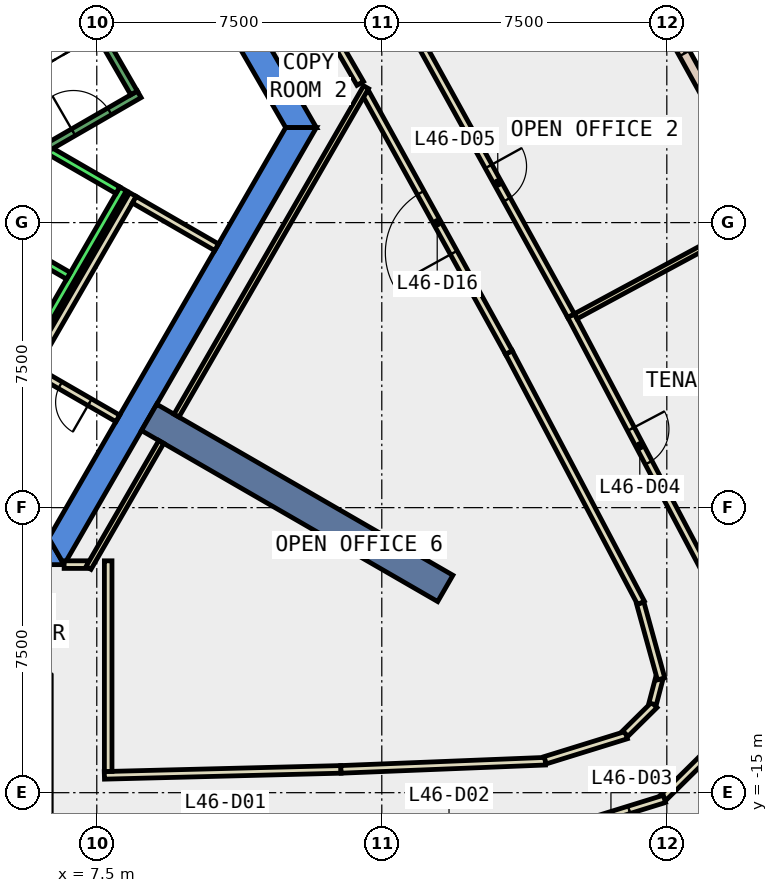
"""IFC4 building model, lengths in metres.
Left out: names, types, materials, properties, quantities, classifications, styles, units other than length and angle.
Written with IfcOpenShell. Run it as: python <this file> out.ifc"""

import sys

from ifc_helpers import new_model, si_unit, direction, frame, frame_2d, origin, place, context, subcontext, project, spatial, polyline, rectangle, outline, extrude, element, fill, save


model = new_model("IFC4")
c1 = context("Model", 3, precision=1e-05, world=origin(), true_north=direction((0.0, 1.0)))
c2 = subcontext(c1, "Body", "Model", "MODEL_VIEW")
j1 = project(units=[si_unit("LENGTHUNIT", "METRE"), si_unit("PLANEANGLEUNIT", "RADIAN")], contexts=[c1])
p1 = place(None, origin())
s1 = spatial("IfcSite", under=j1, at=p1, CompositionType="ELEMENT")
p2 = place(p1, origin())
s2 = spatial("IfcBuilding", under=s1, at=p2, CompositionType="ELEMENT")
p3 = place(p2, frame((0.0, 0.0, 206.6)))
s3 = spatial("IfcBuildingStorey", under=s2, at=p3, CompositionType="ELEMENT", Elevation=206.6)
p4 = place(p3, frame((0.0, 0.0, -0.4)))
e1 = element("IfcWall", 1, at=p4, inside=s3, PredefinedType="SHEAR", context=c2, shape_type="SweptSolid", body=[
    extrude(outline(polyline([(8.084, 11.498), (7.478, 11.148), (12.471, 2.5), (13.279, 2.5), (8.084, 11.498)])), origin(), (0.0, 0.0, 1.0), 4.2),
])
p5 = place(p3, frame((0.0, 0.0, -0.4)))
e2 = element("IfcWall", 2, at=p5, inside=s3, PredefinedType="SHEAR", context=c2, shape_type="SweptSolid", body=[
    extrude(outline(polyline([(5.75, -8.3), (5.75, -9.0), (6.64, -9.0), (6.235, -8.3), (5.75, -8.3)])), origin(), (0.0, 0.0, 1.0), 4.2),
])
p6 = place(p3, frame((0.0, 0.0, -0.4)))
e3 = element("IfcWall", 3, at=p6, inside=s3, PredefinedType="SHEAR", context=c2, shape_type="SweptSolid", body=[
    extrude(outline(polyline([(6.64, -9.0), (13.279, 2.5), (12.471, 2.5), (6.235, -8.3), (6.64, -9.0)])), origin(), (0.0, 0.0, 1.0), 4.2),
])
p7 = place(p3, frame((8.877, -5.125, -0.4), z_axis=(0.0, 0.0, 1.0), x_axis=(0.866017533419, -0.500013631625, 0.0)))
e4 = element("IfcWall", 4, at=p7, inside=s3, PredefinedType="SHEAR", context=c2, shape_type="SweptSolid", body=[
    extrude(rectangle(XDim=9.0, YDim=0.8, at=frame_2d((4.5, 0.0))), origin(), (0.0, 0.0, 1.0), 4.2),
])
p8 = place(p3, frame((25.01, 0.751, 0.0), z_axis=(0.0, 0.0, 1.0), x_axis=(-0.483590905878, 0.875294142419, 0.0)))
e5 = element("IfcWall", 5, at=p8, inside=s3, PredefinedType="STANDARD", context=c2, shape_type="SweptSolid", body=[
    extrude(rectangle(XDim=7.238, YDim=0.3, at=frame_2d((3.619, 0.0))), origin(), (0.0, 0.0, 1.0), 3.8),
])
p9 = place(p8, frame((0.609, 0.0, 0.9)))
e6 = element("IfcOpeningElement", 6, at=p9, cuts=e5, PredefinedType="OPENING", context=c2, shape_type="SweptSolid", body=[
    extrude(rectangle(XDim=2.4, YDim=2.6, at=frame_2d((1.2, 1.3))), frame((0.0, 0.16, 0.0), z_axis=(0.0, -1.0, 0.0), x_axis=(1.0, 0.0, 0.0)), (0.0, 0.0, 1.0), 0.32),
])
p10 = place(p8, frame((4.228, 0.0, 0.9)))
e7 = element("IfcOpeningElement", 7, at=p10, cuts=e5, PredefinedType="OPENING", context=c2, shape_type="SweptSolid", body=[
    extrude(rectangle(XDim=2.4, YDim=2.6, at=frame_2d((1.2, 1.3))), frame((0.0, 0.16, 0.0), z_axis=(0.0, -1.0, 0.0), x_axis=(1.0, 0.0, 0.0)), (0.0, 0.0, 1.0), 0.32),
])
p11 = place(p3, frame((14.433, 3.663, 0.0), z_axis=(0.0, 0.0, 1.0), x_axis=(-0.500149526678, 0.865939057303, 0.0)))
e8 = element("IfcWall", 8, at=p11, inside=s3, PredefinedType="PARTITIONING", context=c2, shape_type="SweptSolid", body=[
    extrude(rectangle(XDim=3.843, YDim=0.2, at=frame_2d((1.921, 0.0))), origin(), (0.0, 0.0, 1.0), 3.8),
])
p12 = place(p11, frame((1.422, 0.0, 0.0)))
e9 = element("IfcOpeningElement", 9, at=p12, cuts=e8, PredefinedType="OPENING", context=c2, shape_type="SweptSolid", body=[
    extrude(rectangle(XDim=1.0, YDim=2.1, at=frame_2d((0.5, 1.05))), frame((0.0, 0.11, 0.0), z_axis=(0.0, -1.0, 0.0), x_axis=(1.0, 0.0, 0.0)), (0.0, 0.0, 1.0), 0.22),
])
p13 = place(p3, frame((7.7, -14.544, 0.0), z_axis=(0.0, 0.0, 1.0), x_axis=(0.99968218628, 0.025209649611, 0.0)))
e10 = element("IfcWall", 10, at=p13, inside=s3, PredefinedType="PARTITIONING", context=c2, shape_type="SweptSolid", body=[
    extrude(rectangle(XDim=6.227, YDim=0.2, at=frame_2d((3.114, 0.0))), origin(), (0.0, 0.0, 1.0), 3.8),
])
p14 = place(p3, frame((13.925, -14.387, 0.0), z_axis=(0.0, 0.0, 1.0), x_axis=(0.999202986342, 0.039917315597, 0.0)))
e11 = element("IfcWall", 11, at=p14, inside=s3, PredefinedType="PARTITIONING", context=c2, shape_type="SweptSolid", body=[
    extrude(rectangle(XDim=5.382, YDim=0.2, at=frame_2d((2.691, 0.0))), origin(), (0.0, 0.0, 1.0), 3.8),
])
p15 = place(p3, frame((19.299, -14.147, 0.0), z_axis=(0.0, 0.0, 1.0), x_axis=(0.955241047187, 0.295828568211, 0.0)))
e12 = element("IfcWall", 12, at=p15, inside=s3, PredefinedType="PARTITIONING", context=c2, shape_type="SweptSolid", body=[
    extrude(rectangle(XDim=2.234, YDim=0.2, at=frame_2d((1.117, 0.0))), origin(), (0.0, 0.0, 1.0), 3.8),
])
p16 = place(p3, frame((21.408, -13.445, 0.0), z_axis=(0.0, 0.0, 1.0), x_axis=(0.711298443117, 0.702890122863, 0.0)))
e13 = element("IfcWall", 13, at=p16, inside=s3, PredefinedType="PARTITIONING", context=c2, shape_type="SweptSolid", body=[
    extrude(rectangle(XDim=1.074, YDim=0.2, at=frame_2d((0.537, 0.0))), origin(), (0.0, 0.0, 1.0), 3.8),
])
p17 = place(p3, frame((22.126, -12.664, 0.0), z_axis=(0.0, 0.0, 1.0), x_axis=(0.253079435581, 0.967445501972, 0.0)))
e14 = element("IfcWall", 14, at=p17, inside=s3, PredefinedType="PARTITIONING", context=c2, shape_type="SweptSolid", body=[
    extrude(rectangle(XDim=0.68, YDim=0.2, at=frame_2d((0.34, 0.0))), origin(), (0.0, 0.0, 1.0), 3.8),
])
p18 = place(p3, frame((22.35, -12.006, 0.0), z_axis=(0.0, 0.0, 1.0), x_axis=(-0.265584627827, 0.964087550725, 0.0)))
e15 = element("IfcWall", 15, at=p18, inside=s3, PredefinedType="PARTITIONING", context=c2, shape_type="SweptSolid", body=[
    extrude(rectangle(XDim=2.067, YDim=0.2, at=frame_2d((1.034, 0.0))), origin(), (0.0, 0.0, 1.0), 3.8),
])
p19 = place(p3, frame((21.821, -10.005, 0.0), z_axis=(0.0, 0.0, 1.0), x_axis=(-0.466770012358, 0.884378739887, 0.0)))
e16 = element("IfcWall", 16, at=p19, inside=s3, PredefinedType="PARTITIONING", context=c2, shape_type="SweptSolid", body=[
    extrude(rectangle(XDim=7.449, YDim=0.2, at=frame_2d((3.725, 0.0))), origin(), (0.0, 0.0, 1.0), 3.8),
])
p20 = place(p3, frame((18.344, -3.417, 0.0), z_axis=(0.0, 0.0, 1.0), x_axis=(-0.483555501116, 0.875313702247, 0.0)))
e17 = element("IfcWall", 17, at=p20, inside=s3, PredefinedType="PARTITIONING", context=c2, shape_type="SweptSolid", body=[
    extrude(rectangle(XDim=7.801, YDim=0.2, at=frame_2d((3.9, 0.0))), origin(), (0.0, 0.0, 1.0), 3.8),
])
p21 = place(p20, frame((3.0, 0.0, 0.0)))
e18 = element("IfcOpeningElement", 18, at=p21, cuts=e17, PredefinedType="OPENING", context=c2, shape_type="SweptSolid", body=[
    extrude(rectangle(XDim=1.8, YDim=2.1, at=frame_2d((0.9, 1.05))), frame((0.0, 0.11, 0.0), z_axis=(0.0, -1.0, 0.0), x_axis=(1.0, 0.0, 0.0)), (0.0, 0.0, 1.0), 0.22),
])
p22 = place(p3, frame((23.878, -13.675, 0.0), z_axis=(0.0, 0.0, 1.0), x_axis=(-0.710949827962, -0.703242733429, 0.0)))
e19 = element("IfcWall", 19, at=p22, inside=s3, PredefinedType="PARTITIONING", context=c2, shape_type="SweptSolid", body=[
    extrude(rectangle(XDim=2.059, YDim=0.2, at=frame_2d((1.03, 0.0))), origin(), (0.0, 0.0, 1.0), 3.8),
])
p23 = place(p3, frame((22.438, -15.163, 0.0), z_axis=(0.0, 0.0, 1.0), x_axis=(-0.955234616163, -0.295849333419, 0.0)))
e20 = element("IfcWall", 20, at=p23, inside=s3, PredefinedType="PARTITIONING", context=c2, shape_type="SweptSolid", body=[
    extrude(rectangle(XDim=2.947, YDim=0.2, at=frame_2d((1.473, 0.0))), origin(), (0.0, 0.0, 1.0), 3.8),
])
p24 = place(p23, frame((0.974, 0.0, 0.0)))
e21 = element("IfcOpeningElement", 21, at=p24, cuts=e20, PredefinedType="OPENING", context=c2, shape_type="SweptSolid", body=[
    extrude(rectangle(XDim=1.0, YDim=2.1, at=frame_2d((0.5, 1.05))), frame((0.0, 0.11, 0.0), z_axis=(0.0, -1.0, 0.0), x_axis=(1.0, 0.0, 0.0)), (0.0, 0.0, 1.0), 0.22),
])
p25 = place(p3, frame((19.98, -2.448, 0.0), z_axis=(0.0, 0.0, 1.0), x_axis=(0.466864023915, -0.884329114738, 0.0)))
e22 = element("IfcWall", 22, at=p25, inside=s3, PredefinedType="PARTITIONING", context=c2, shape_type="SweptSolid", body=[
    extrude(rectangle(XDim=7.75, YDim=0.2, at=frame_2d((3.875, 0.0))), origin(), (0.0, 0.0, 1.0), 3.8),
])
p26 = place(p25, frame((3.375, 0.0, 0.0)))
e23 = element("IfcOpeningElement", 23, at=p26, cuts=e22, PredefinedType="OPENING", context=c2, shape_type="SweptSolid", body=[
    extrude(rectangle(XDim=1.0, YDim=2.1, at=frame_2d((0.5, 1.05))), frame((0.0, 0.11, 0.0), z_axis=(0.0, -1.0, 0.0), x_axis=(1.0, 0.0, 0.0)), (0.0, 0.0, 1.0), 0.22),
])
p27 = place(p3, frame((16.051, 4.663, 0.0), z_axis=(0.0, 0.0, 1.0), x_axis=(0.483513440344, -0.875336936846, 0.0)))
e24 = element("IfcWall", 24, at=p27, inside=s3, PredefinedType="PARTITIONING", context=c2, shape_type="SweptSolid", body=[
    extrude(rectangle(XDim=8.124, YDim=0.2, at=frame_2d((4.062, 0.0))), origin(), (0.0, 0.0, 1.0), 3.8),
])
p28 = place(p27, frame((3.637, 0.0, 0.0)))
e25 = element("IfcOpeningElement", 25, at=p28, cuts=e24, PredefinedType="OPENING", context=c2, shape_type="SweptSolid", body=[
    extrude(rectangle(XDim=1.0, YDim=2.1, at=frame_2d((0.5, 1.05))), frame((0.0, 0.11, 0.0), z_axis=(0.0, -1.0, 0.0), x_axis=(1.0, 0.0, 0.0)), (0.0, 0.0, 1.0), 0.22),
])
p29 = place(p3, frame((8.053, -5.152, 0.0), z_axis=(0.0, 0.0, 1.0), x_axis=(-0.866022959057, 0.500004234368, 0.0)))
e26 = element("IfcWall", 26, at=p29, inside=s3, PredefinedType="PARTITIONING", context=c2, shape_type="SweptSolid", body=[
    extrude(rectangle(XDim=2.5, YDim=0.2, at=frame_2d((1.25, 0.0))), origin(), (0.0, 0.0, 1.0), 3.8),
])
p30 = place(p29, frame((0.85, 0.0, 0.0)))
e27 = element("IfcOpeningElement", 27, at=p30, cuts=e26, PredefinedType="OPENING", context=c2, shape_type="SweptSolid", body=[
    extrude(rectangle(XDim=0.9, YDim=2.1, at=frame_2d((0.45, 1.05))), frame((0.0, 0.11, 0.0), z_axis=(0.0, -1.0, 0.0), x_axis=(1.0, 0.0, 0.0)), (0.0, 0.0, 1.0), 0.22),
])
p31 = place(p3, frame((5.751, -3.938, 0.0), z_axis=(0.0, 0.0, 1.0), x_axis=(0.500034260056, 0.866005622828, 0.0)))
e28 = element("IfcWall", 28, at=p31, inside=s3, PredefinedType="PARTITIONING", context=c2, shape_type="SweptSolid", body=[
    extrude(rectangle(XDim=5.399, YDim=0.2, at=frame_2d((2.7, 0.0))), origin(), (0.0, 0.0, 1.0), 3.8),
])
p32 = place(p3, frame((8.488, 0.602, 0.0), z_axis=(0.0, 0.0, 1.0), x_axis=(0.866022959057, -0.500004234368, 0.0)))
e29 = element("IfcWall", 29, at=p32, inside=s3, PredefinedType="PARTITIONING", context=c2, shape_type="SweptSolid", body=[
    extrude(rectangle(XDim=2.5, YDim=0.2, at=frame_2d((1.25, 0.0))), origin(), (0.0, 0.0, 1.0), 3.8),
])
p33 = place(p3, frame((6.641, -8.999, 0.0), z_axis=(0.0, 0.0, 1.0), x_axis=(1.0, 0.0, 0.0)))
e30 = element("IfcWall", 30, at=p33, inside=s3, PredefinedType="PARTITIONING", context=c2, shape_type="SweptSolid", body=[
    extrude(rectangle(XDim=0.617, YDim=0.2, at=frame_2d((0.309, 0.0))), origin(), (0.0, 0.0, 1.0), 3.8),
])
p34 = place(p3, frame((7.283, -9.086, 0.0), z_axis=(0.0, 0.0, 1.0), x_axis=(0.500035303972, 0.866005020067, 0.0)))
e31 = element("IfcWall", 31, at=p34, inside=s3, PredefinedType="PARTITIONING", context=c2, shape_type="SweptSolid", body=[
    extrude(rectangle(XDim=3.828, YDim=0.15, at=frame_2d((1.914, 0.0))), origin(), (0.0, 0.0, 1.0), 3.8),
])
p35 = place(p3, frame((7.8, -8.899, 0.0), z_axis=(0.0, 0.0, 1.0), x_axis=(0.0, -1.0, 0.0)))
e32 = element("IfcWall", 32, at=p35, inside=s3, PredefinedType="PARTITIONING", context=c2, shape_type="SweptSolid", body=[
    extrude(rectangle(XDim=5.542, YDim=0.2, at=frame_2d((2.771, 0.0))), origin(), (0.0, 0.0, 1.0), 3.8),
])
p36 = place(p3, frame((20.103, -2.466, 0.0), z_axis=(0.0, 0.0, 1.0), x_axis=(0.879965969606, 0.475036727354, 0.0)))
e33 = element("IfcWall", 33, at=p36, inside=s3, PredefinedType="PARTITIONING", context=c2, shape_type="SweptSolid", body=[
    extrude(rectangle(XDim=4.381, YDim=0.15, at=frame_2d((2.19, 0.0))), origin(), (0.0, 0.0, 1.0), 3.8),
])
p37 = place(p3, frame((9.597, -5.079, 0.0), z_axis=(0.0, 0.0, 1.0), x_axis=(0.499962477963, 0.866047066059, 0.0)))
e34 = element("IfcWall", 34, at=p37, inside=s3, PredefinedType="PARTITIONING", context=c2, shape_type="SweptSolid", body=[
    extrude(rectangle(XDim=9.979, YDim=0.15, at=frame_2d((4.989, 0.0))), origin(), (0.0, 0.0, 1.0), 3.8),
])
p38 = place(p3, frame((5.492, -3.788, 0.0), z_axis=(0.0, 0.0, 1.0), x_axis=(0.500034260056, 0.866005622828, 0.0)))
e35 = element("IfcWall", 35, at=p38, inside=s3, PredefinedType="STANDARD", context=c2, shape_type="SweptSolid", body=[
    extrude(rectangle(XDim=5.399, YDim=0.2, at=frame_2d((2.7, 0.0))), origin(), (0.0, 0.0, 1.0), 3.8),
])
for number, where, z_axis, x_axis in (
    (36, (4.677, -0.2, 0.0), (0.0, 0.0, 1.0), (0.866, -0.5, 0.0)),
    (37, (5.977, 2.052, 0.0), (0.0, 0.0, 1.0), (0.866, -0.5, 0.0)),
):
    element("IfcWall", number, at=place(p3, frame(where, z_axis=z_axis, x_axis=x_axis)), inside=s3, PredefinedType="STANDARD", context=c2, shape_type="SweptSolid", body=[
        extrude(rectangle(XDim=2.399, YDim=0.2, at=frame_2d((1.2, 0.0))), origin(), (0.0, 0.0, 1.0), 3.8),
    ])
p39 = place(p3, frame((4.806, 1.176, 0.0), z_axis=(0.0, 0.0, 1.0), x_axis=(0.866059941101, 0.499940174841, 0.0)))
e38 = element("IfcWall", 38, at=p39, inside=s3, PredefinedType="STANDARD", context=c2, shape_type="SweptSolid", body=[
    extrude(rectangle(XDim=4.4, YDim=0.2, at=frame_2d((2.2, 0.0))), origin(), (0.0, 0.0, 1.0), 3.8),
])
p40 = place(p39, frame((2.4, 0.0, 0.0)))
e39 = element("IfcOpeningElement", 39, at=p40, cuts=e38, PredefinedType="OPENING", context=c2, shape_type="SweptSolid", body=[
    extrude(rectangle(XDim=1.1, YDim=2.2, at=frame_2d((0.55, 1.1))), frame((0.0, 0.11, 0.0), z_axis=(0.0, -1.0, 0.0), x_axis=(1.0, 0.0, 0.0)), (0.0, 0.0, 1.0), 0.22),
])
p41 = place(p3, frame((8.48, 3.412, 0.0), z_axis=(0.0, 0.0, 1.0), x_axis=(-0.499978703459, 0.866037698999, 0.0)))
e40 = element("IfcWall", 40, at=p41, inside=s3, PredefinedType="STANDARD", context=c2, shape_type="SweptSolid", body=[
    extrude(rectangle(XDim=6.9, YDim=0.2, at=frame_2d((3.45, 0.0))), origin(), (0.0, 0.0, 1.0), 3.8),
])
p42 = place(p10, origin())
e41 = element("IfcWindow", 41, at=p42, inside=s3, PartitioningType="SINGLE_PANEL", PredefinedType="WINDOW", context=c2, shape_type="SweptSolid", body=[
    extrude(rectangle(XDim=2.4, YDim=2.6, at=frame_2d((1.2, 1.3))), frame((0.0, 0.03, 0.0), z_axis=(0.0, -1.0, 0.0), x_axis=(1.0, 0.0, 0.0)), (0.0, 0.0, 1.0), 0.06),
])
fill(e7, e41)
p43 = place(p24, origin())
e42 = element("IfcDoor", 42, at=p43, inside=s3, OperationType="SINGLE_SWING_LEFT", PredefinedType="DOOR", context=c2, shape_type="SweptSolid", body=[
    extrude(rectangle(XDim=1.0, YDim=2.1, at=frame_2d((0.5, 1.05))), frame((0.0, 0.025, 0.0), z_axis=(0.0, -1.0, 0.0), x_axis=(1.0, 0.0, 0.0)), (0.0, 0.0, 1.0), 0.05),
])
fill(e21, e42)
p44 = place(p26, origin())
e43 = element("IfcDoor", 43, at=p44, inside=s3, OperationType="SINGLE_SWING_LEFT", PredefinedType="DOOR", context=c2, shape_type="SweptSolid", body=[
    extrude(rectangle(XDim=1.0, YDim=2.1, at=frame_2d((0.5, 1.05))), frame((0.0, 0.025, 0.0), z_axis=(0.0, -1.0, 0.0), x_axis=(1.0, 0.0, 0.0)), (0.0, 0.0, 1.0), 0.05),
])
fill(e23, e43)
p45 = place(p28, origin())
e44 = element("IfcDoor", 44, at=p45, inside=s3, OperationType="SINGLE_SWING_RIGHT", PredefinedType="DOOR", context=c2, shape_type="SweptSolid", body=[
    extrude(rectangle(XDim=1.0, YDim=2.1, at=frame_2d((0.5, 1.05))), frame((0.0, 0.025, 0.0), z_axis=(0.0, -1.0, 0.0), x_axis=(1.0, 0.0, 0.0)), (0.0, 0.0, 1.0), 0.05),
])
fill(e25, e44)
p46 = place(p21, origin())
e45 = element("IfcDoor", 45, at=p46, inside=s3, OperationType="DOUBLE_DOOR_SINGLE_SWING", PredefinedType="DOOR", context=c2, shape_type="SweptSolid", body=[
    extrude(rectangle(XDim=1.8, YDim=2.1, at=frame_2d((0.9, 1.05))), frame((0.0, 0.025, 0.0), z_axis=(0.0, -1.0, 0.0), x_axis=(1.0, 0.0, 0.0)), (0.0, 0.0, 1.0), 0.05),
])
fill(e18, e45)
p47 = place(p30, origin())
e46 = element("IfcDoor", 46, at=p47, inside=s3, OperationType="SINGLE_SWING_LEFT", PredefinedType="DOOR", context=c2, shape_type="SweptSolid", body=[
    extrude(rectangle(XDim=0.9, YDim=2.1, at=frame_2d((0.45, 1.05))), frame((0.0, 0.025, 0.0), z_axis=(0.0, -1.0, 0.0), x_axis=(1.0, 0.0, 0.0)), (0.0, 0.0, 1.0), 0.05),
])
fill(e27, e46)
p48 = place(p40, origin())
e47 = element("IfcDoor", 47, at=p48, inside=s3, OperationType="SINGLE_SWING_LEFT", PredefinedType="DOOR", context=c2, shape_type="SweptSolid", body=[
    extrude(rectangle(XDim=1.1, YDim=2.2, at=frame_2d((0.55, 1.1))), frame((0.0, 0.025, 0.0), z_axis=(0.0, -1.0, 0.0), x_axis=(1.0, 0.0, 0.0)), (0.0, 0.0, 1.0), 0.05),
])
fill(e39, e47)
save(model, sys.argv[1])
